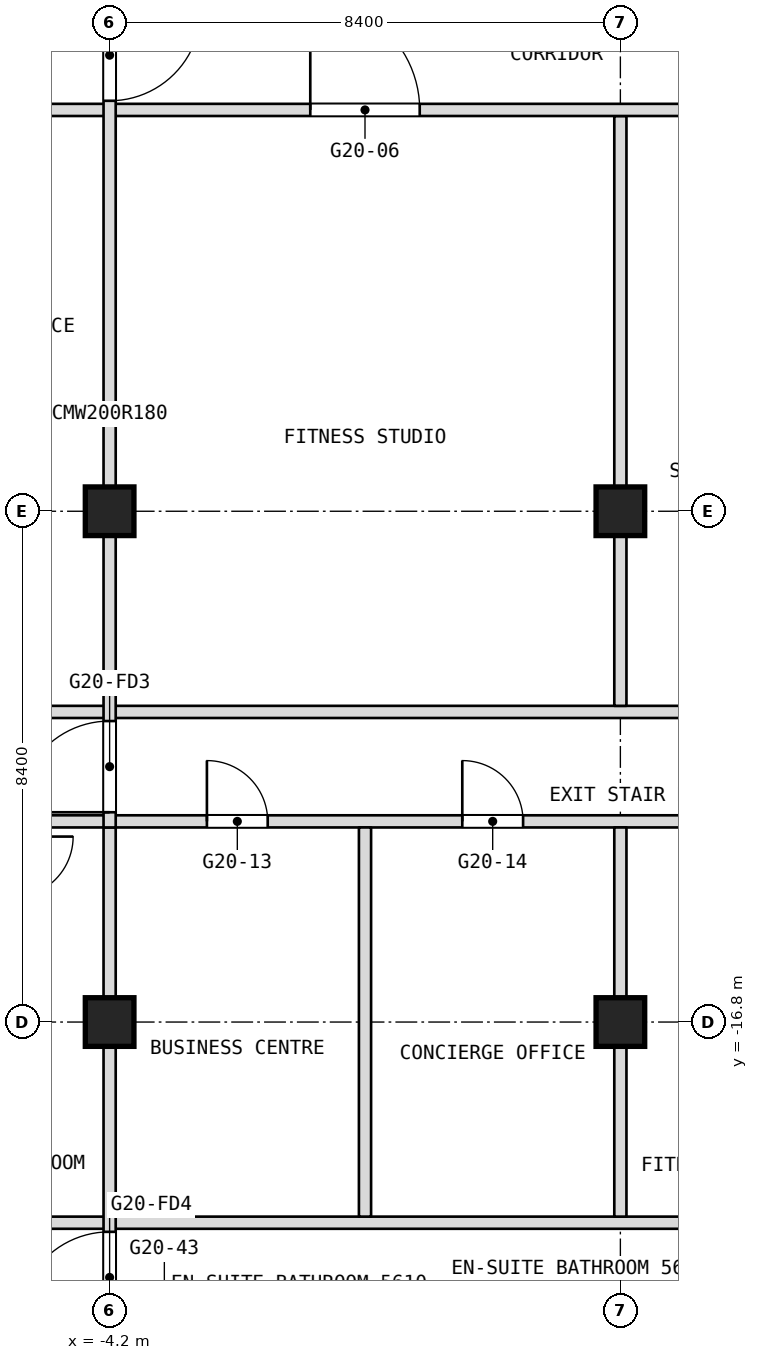
"""IFC4 building model, lengths in metres.
Left out: names, types, materials, properties, quantities, classifications, styles, units other than length and angle.
Written with IfcOpenShell. Run it as: python <this file> out.ifc"""

import sys

from ifc_helpers import new_model, si_unit, direction, frame, frame_2d, origin, origin_2d, place, context, subcontext, project, spatial, rectangle, extrude, element, fill, save


model = new_model("IFC4")
c1 = context("Model", 3, precision=1e-05, world=origin(), true_north=direction((0.0, 1.0)))
c2 = subcontext(c1, "Body", "Model", "MODEL_VIEW")
j1 = project(units=[si_unit("LENGTHUNIT", "METRE"), si_unit("PLANEANGLEUNIT", "RADIAN")], contexts=[c1])
p1 = place(None, origin())
s1 = spatial("IfcSite", under=j1, at=p1, CompositionType="ELEMENT")
p2 = place(p1, origin())
s2 = spatial("IfcBuilding", under=s1, at=p2, CompositionType="ELEMENT")
p3 = place(p2, frame((0.0, 0.0, 238.1)))
s3 = spatial("IfcBuildingStorey", under=s2, at=p3, CompositionType="ELEMENT", Elevation=238.1)
for number, where, z_axis, x_axis in (
    (1, (-4.2, -16.8, 0.0), (0.0, 0.0, 1.0), (1.0, 0.0, 0.0)),
    (2, (-4.2, -8.4, 0.0), (0.0, 0.0, 1.0), (1.0, 0.0, 0.0)),
    (3, (4.2, -16.8, 0.0), (0.0, 0.0, 1.0), (1.0, 0.0, 0.0)),
    (4, (4.2, -8.4, 0.0), (0.0, 0.0, 1.0), (1.0, 0.0, 0.0)),
):
    element("IfcColumn", number, at=place(p3, frame(where, z_axis=z_axis, x_axis=x_axis)), inside=s3, PredefinedType="COLUMN", context=c2, shape_type="SweptSolid", body=[
        extrude(rectangle(XDim=0.8, YDim=0.8, at=origin_2d()), origin(), (0.0, 0.0, 1.0), 3.6),
    ])
p4 = place(p3, frame((-16.7, -20.1, 0.0), z_axis=(0.0, 0.0, 1.0), x_axis=(1.0, 0.0, 0.0)))
e5 = element("IfcWall", 5, at=p4, inside=s3, PredefinedType="PARTITIONING", context=c2, shape_type="SweptSolid", body=[
    extrude(rectangle(XDim=33.4, YDim=0.2, at=frame_2d((16.7, 0.0))), origin(), (0.0, 0.0, 1.0), 3.34),
])
p5 = place(p3, frame((-5.9, -13.5, 0.0), z_axis=(0.0, 0.0, 1.0), x_axis=(1.0, 0.0, 0.0)))
e6 = element("IfcWall", 6, at=p5, inside=s3, PredefinedType="PARTITIONING", context=c2, shape_type="SweptSolid", body=[
    extrude(rectangle(XDim=11.6, YDim=0.2, at=frame_2d((5.8, 0.0))), origin(), (0.0, 0.0, 1.0), 3.34),
])
p6 = place(p5, frame((3.3, 0.0, 0.0)))
e7 = element("IfcOpeningElement", 7, at=p6, cuts=e6, PredefinedType="OPENING", context=c2, shape_type="SweptSolid", body=[
    extrude(rectangle(XDim=1.0, YDim=2.1, at=frame_2d((0.5, 1.05))), frame((0.0, 0.1, 0.0), z_axis=(0.0, -1.0, 0.0), x_axis=(1.0, 0.0, 0.0)), (0.0, 0.0, 1.0), 0.2),
])
p7 = place(p5, frame((7.5, 0.0, 0.0)))
e8 = element("IfcOpeningElement", 8, at=p7, cuts=e6, PredefinedType="OPENING", context=c2, shape_type="SweptSolid", body=[
    extrude(rectangle(XDim=1.0, YDim=2.1, at=frame_2d((0.5, 1.05))), frame((0.0, 0.1, 0.0), z_axis=(0.0, -1.0, 0.0), x_axis=(1.0, 0.0, 0.0)), (0.0, 0.0, 1.0), 0.2),
])
p8 = place(p3, frame((-7.3, -11.7, 0.0), z_axis=(0.0, 0.0, 1.0), x_axis=(1.0, 0.0, 0.0)))
e9 = element("IfcWall", 9, at=p8, inside=s3, PredefinedType="PARTITIONING", context=c2, shape_type="SweptSolid", body=[
    extrude(rectangle(XDim=14.6, YDim=0.2, at=frame_2d((7.3, 0.0))), origin(), (0.0, 0.0, 1.0), 3.34),
])
p9 = place(p3, frame((4.2, -20.0, 0.0), z_axis=(0.0, 0.0, 1.0), x_axis=(0.0, 1.0, 0.0)))
e10 = element("IfcWall", 10, at=p9, inside=s3, PredefinedType="PARTITIONING", context=c2, shape_type="SweptSolid", body=[
    extrude(rectangle(XDim=6.4, YDim=0.2, at=frame_2d((3.2, 0.0))), origin(), (0.0, 0.0, 1.0), 3.34),
])
p10 = place(p3, frame((4.2, -11.6, 0.0), z_axis=(0.0, 0.0, 1.0), x_axis=(0.0, 1.0, 0.0)))
e11 = element("IfcWall", 11, at=p10, inside=s3, PredefinedType="PARTITIONING", context=c2, shape_type="SweptSolid", body=[
    extrude(rectangle(XDim=9.7, YDim=0.2, at=frame_2d((4.85, 0.0))), origin(), (0.0, 0.0, 1.0), 3.34),
])
p11 = place(p3, frame((-16.9, -1.8, 0.0), z_axis=(0.0, 0.0, 1.0), x_axis=(1.0, 0.0, 0.0)))
e12 = element("IfcWall", 12, at=p11, inside=s3, PredefinedType="PARTITIONING", context=c2, shape_type="SweptSolid", body=[
    extrude(rectangle(XDim=33.8, YDim=0.2, at=frame_2d((16.9, 0.0))), origin(), (0.0, 0.0, 1.0), 3.34),
])
p12 = place(p11, frame((1.7, 0.0, 0.0)))
e13 = element("IfcOpeningElement", 13, at=p12, cuts=e12, PredefinedType="OPENING", context=c2, shape_type="SweptSolid", body=[
    extrude(rectangle(XDim=1.0, YDim=2.1, at=frame_2d((0.5, 1.05))), frame((0.0, 0.1, 0.0), z_axis=(0.0, -1.0, 0.0), x_axis=(1.0, 0.0, 0.0)), (0.0, 0.0, 1.0), 0.2),
])
p13 = place(p11, frame((5.9, 0.0, 0.0)))
e14 = element("IfcOpeningElement", 14, at=p13, cuts=e12, PredefinedType="OPENING", context=c2, shape_type="SweptSolid", body=[
    extrude(rectangle(XDim=1.0, YDim=2.1, at=frame_2d((0.5, 1.05))), frame((0.0, 0.1, 0.0), z_axis=(0.0, -1.0, 0.0), x_axis=(1.0, 0.0, 0.0)), (0.0, 0.0, 1.0), 0.2),
])
p14 = place(p11, frame((10.1, 0.0, 0.0)))
e15 = element("IfcOpeningElement", 15, at=p14, cuts=e12, PredefinedType="OPENING", context=c2, shape_type="SweptSolid", body=[
    extrude(rectangle(XDim=1.0, YDim=2.1, at=frame_2d((0.5, 1.05))), frame((0.0, 0.1, 0.0), z_axis=(0.0, -1.0, 0.0), x_axis=(1.0, 0.0, 0.0)), (0.0, 0.0, 1.0), 0.2),
])
p15 = place(p11, frame((16.0, 0.0, 0.0)))
e16 = element("IfcOpeningElement", 16, at=p15, cuts=e12, PredefinedType="OPENING", context=c2, shape_type="SweptSolid", body=[
    extrude(rectangle(XDim=1.8, YDim=2.1, at=frame_2d((0.9, 1.05))), frame((0.0, 0.1, 0.0), z_axis=(0.0, -1.0, 0.0), x_axis=(1.0, 0.0, 0.0)), (0.0, 0.0, 1.0), 0.2),
])
p16 = place(p11, frame((22.7, 0.0, 0.0)))
e17 = element("IfcOpeningElement", 17, at=p16, cuts=e12, PredefinedType="OPENING", context=c2, shape_type="SweptSolid", body=[
    extrude(rectangle(XDim=1.0, YDim=2.1, at=frame_2d((0.5, 1.05))), frame((0.0, 0.1, 0.0), z_axis=(0.0, -1.0, 0.0), x_axis=(1.0, 0.0, 0.0)), (0.0, 0.0, 1.0), 0.2),
])
p17 = place(p11, frame((26.9, 0.0, 0.0)))
e18 = element("IfcOpeningElement", 18, at=p17, cuts=e12, PredefinedType="OPENING", context=c2, shape_type="SweptSolid", body=[
    extrude(rectangle(XDim=1.0, YDim=2.1, at=frame_2d((0.5, 1.05))), frame((0.0, 0.1, 0.0), z_axis=(0.0, -1.0, 0.0), x_axis=(1.0, 0.0, 0.0)), (0.0, 0.0, 1.0), 0.2),
])
p18 = place(p11, frame((31.1, 0.0, 0.0)))
e19 = element("IfcOpeningElement", 19, at=p18, cuts=e12, PredefinedType="OPENING", context=c2, shape_type="SweptSolid", body=[
    extrude(rectangle(XDim=1.0, YDim=2.1, at=frame_2d((0.5, 1.05))), frame((0.0, 0.1, 0.0), z_axis=(0.0, -1.0, 0.0), x_axis=(1.0, 0.0, 0.0)), (0.0, 0.0, 1.0), 0.2),
])
p19 = place(p3, frame((0.0, -20.0, 0.0), z_axis=(0.0, 0.0, 1.0), x_axis=(0.0, 1.0, 0.0)))
e20 = element("IfcWall", 20, at=p19, inside=s3, PredefinedType="PARTITIONING", context=c2, shape_type="SweptSolid", body=[
    extrude(rectangle(XDim=6.4, YDim=0.2, at=frame_2d((3.2, 0.0))), origin(), (0.0, 0.0, 1.0), 3.34),
])
p20 = place(p3, frame((-4.2, -22.0, 0.0), z_axis=(0.0, 0.0, 1.0), x_axis=(0.0, 1.0, 0.0)))
e21 = element("IfcWall", 21, at=p20, inside=s3, PredefinedType="PARTITIONING", context=c2, shape_type="SweptSolid", body=[
    extrude(rectangle(XDim=8.4, YDim=0.2, at=frame_2d((4.2, 0.0))), origin(), (0.0, 0.0, 1.0), 3.34),
])
p21 = place(p20, frame((0.25, 0.0, 0.0)))
e22 = element("IfcOpeningElement", 22, at=p21, cuts=e21, PredefinedType="OPENING", context=c2, shape_type="SweptSolid", body=[
    extrude(rectangle(XDim=1.5, YDim=2.1, at=frame_2d((0.75, 1.05))), frame((0.0, 0.1, 0.0), z_axis=(0.0, -1.0, 0.0), x_axis=(1.0, 0.0, 0.0)), (0.0, 0.0, 1.0), 0.2),
])
p22 = place(p3, frame((-4.2, -13.6, 0.0), z_axis=(0.0, 0.0, 1.0), x_axis=(0.0, 1.0, 0.0)))
e23 = element("IfcWall", 23, at=p22, inside=s3, PredefinedType="PARTITIONING", context=c2, shape_type="SweptSolid", body=[
    extrude(rectangle(XDim=13.6, YDim=0.2, at=frame_2d((6.8, 0.0))), origin(), (0.0, 0.0, 1.0), 3.34),
])
p23 = place(p22, frame((11.95, 0.0, 0.0)))
e24 = element("IfcOpeningElement", 24, at=p23, cuts=e23, PredefinedType="OPENING", context=c2, shape_type="SweptSolid", body=[
    extrude(rectangle(XDim=1.5, YDim=2.1, at=frame_2d((0.75, 1.05))), frame((0.0, 0.1, 0.0), z_axis=(0.0, -1.0, 0.0), x_axis=(1.0, 0.0, 0.0)), (0.0, 0.0, 1.0), 0.2),
])
p24 = place(p22, frame((0.25, 0.0, 0.0)))
e25 = element("IfcOpeningElement", 25, at=p24, cuts=e23, PredefinedType="OPENING", context=c2, shape_type="SweptSolid", body=[
    extrude(rectangle(XDim=1.5, YDim=2.1, at=frame_2d((0.75, 1.05))), frame((0.0, 0.1, 0.0), z_axis=(0.0, -1.0, 0.0), x_axis=(1.0, 0.0, 0.0)), (0.0, 0.0, 1.0), 0.2),
])
p25 = place(p6, origin())
e26 = element("IfcDoor", 26, at=p25, inside=s3, OperationType="SINGLE_SWING_LEFT", PredefinedType="DOOR", context=c2, shape_type="SweptSolid", body=[
    extrude(rectangle(XDim=1.0, YDim=2.1, at=frame_2d((0.5, 1.05))), frame((0.0, 0.025, 0.0), z_axis=(0.0, -1.0, 0.0), x_axis=(1.0, 0.0, 0.0)), (0.0, 0.0, 1.0), 0.05),
])
fill(e7, e26)
p26 = place(p7, origin())
e27 = element("IfcDoor", 27, at=p26, inside=s3, OperationType="SINGLE_SWING_RIGHT", PredefinedType="DOOR", context=c2, shape_type="SweptSolid", body=[
    extrude(rectangle(XDim=1.0, YDim=2.1, at=frame_2d((0.5, 1.05))), frame((0.0, 0.025, 0.0), z_axis=(0.0, -1.0, 0.0), x_axis=(1.0, 0.0, 0.0)), (0.0, 0.0, 1.0), 0.05),
])
fill(e8, e27)
p27 = place(p15, origin())
e28 = element("IfcDoor", 28, at=p27, inside=s3, OperationType="DOUBLE_DOOR_SINGLE_SWING", PredefinedType="DOOR", context=c2, shape_type="SweptSolid", body=[
    extrude(rectangle(XDim=1.8, YDim=2.1, at=frame_2d((0.9, 1.05))), frame((0.0, 0.025, 0.0), z_axis=(0.0, -1.0, 0.0), x_axis=(1.0, 0.0, 0.0)), (0.0, 0.0, 1.0), 0.05),
])
fill(e16, e28)
p28 = place(p23, origin())
e29 = element("IfcDoor", 29, at=p28, inside=s3, OperationType="DOUBLE_DOOR_DOUBLE_SWING", PredefinedType="DOOR", context=c2, shape_type="SweptSolid", body=[
    extrude(rectangle(XDim=1.5, YDim=2.1, at=frame_2d((0.75, 1.05))), frame((0.0, 0.025, 0.0), z_axis=(0.0, -1.0, 0.0), x_axis=(1.0, 0.0, 0.0)), (0.0, 0.0, 1.0), 0.05),
])
fill(e24, e29)
p29 = place(p24, origin())
e30 = element("IfcDoor", 30, at=p29, inside=s3, OperationType="DOUBLE_DOOR_DOUBLE_SWING", PredefinedType="DOOR", context=c2, shape_type="SweptSolid", body=[
    extrude(rectangle(XDim=1.5, YDim=2.1, at=frame_2d((0.75, 1.05))), frame((0.0, 0.025, 0.0), z_axis=(0.0, -1.0, 0.0), x_axis=(1.0, 0.0, 0.0)), (0.0, 0.0, 1.0), 0.05),
])
fill(e25, e30)
p30 = place(p21, origin())
e31 = element("IfcDoor", 31, at=p30, inside=s3, OperationType="DOUBLE_DOOR_DOUBLE_SWING", PredefinedType="DOOR", context=c2, shape_type="SweptSolid", body=[
    extrude(rectangle(XDim=1.5, YDim=2.1, at=frame_2d((0.75, 1.05))), frame((0.0, 0.025, 0.0), z_axis=(0.0, -1.0, 0.0), x_axis=(1.0, 0.0, 0.0)), (0.0, 0.0, 1.0), 0.05),
])
fill(e22, e31)
save(model, sys.argv[1])
